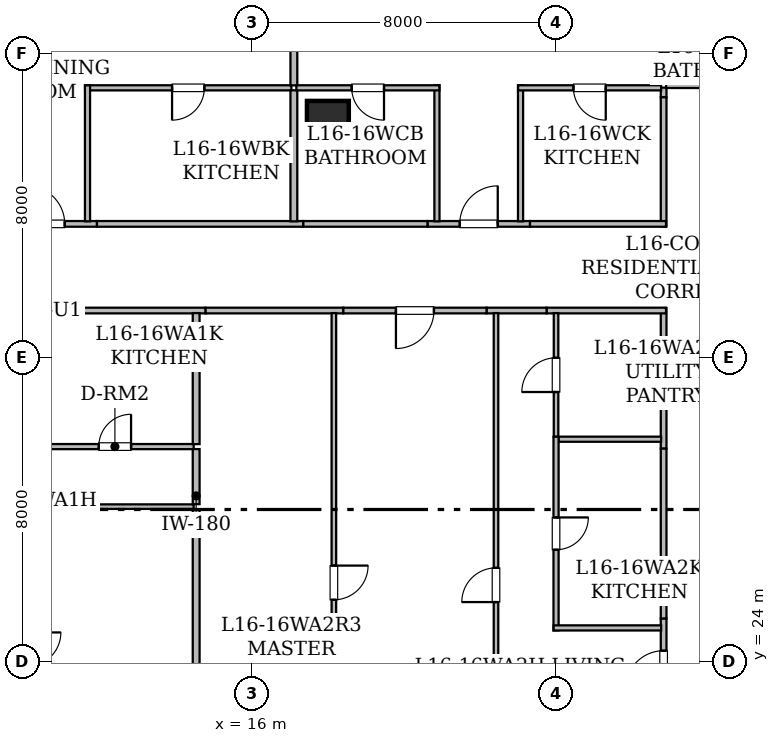
"""IFC4 building model, lengths in metres.
Left out: names, types, materials, properties, quantities, classifications, styles, units other than length and angle.
Written with IfcOpenShell. Run it as: python <this file> out.ifc"""

import sys

from ifc_helpers import new_model, si_unit, direction, frame, frame_2d, origin, origin_2d, place, context, subcontext, project, spatial, rectangle, hollow_rectangle, extrude, element, fill, save


model = new_model("IFC4")
c1 = context("Model", 3, precision=1e-05, world=origin(), true_north=direction((0.0, 1.0)))
c2 = subcontext(c1, "Body", "Model", "MODEL_VIEW")
j1 = project(units=[si_unit("LENGTHUNIT", "METRE"), si_unit("PLANEANGLEUNIT", "RADIAN")], contexts=[c1])
p1 = place(None, origin())
s1 = spatial("IfcSite", under=j1, at=p1, CompositionType="ELEMENT")
p2 = place(p1, origin())
s2 = spatial("IfcBuilding", under=s1, at=p2, CompositionType="ELEMENT")
p3 = place(p2, frame((0.0, 0.0, 66.15)))
s3 = spatial("IfcBuildingStorey", under=s2, at=p3, CompositionType="ELEMENT", Elevation=66.15)
p4 = place(p3, frame((18.0, 38.2, 0.0), z_axis=(0.0, 0.0, 1.0), x_axis=(1.0, 0.0, 0.0)))
e1 = element("IfcColumn", 1, at=p4, inside=s3, PredefinedType="COLUMN", context=c2, shape_type="SweptSolid", body=[
    extrude(hollow_rectangle(XDim=1.1, YDim=1.1, WallThickness=0.055, at=origin_2d()), origin(), (0.0, 0.0, 1.0), 3.65),
])
p5 = place(p3, frame((14.783, 33.235, 0.0), z_axis=(0.0, 0.0, 1.0), x_axis=(-1.0, 0.0, 0.0)))
e2 = element("IfcWall", 2, at=p5, inside=s3, PredefinedType="STANDARD", context=c2, shape_type="SweptSolid", body=[
    extrude(rectangle(XDim=4.145, YDim=0.15, at=frame_2d((2.073, 0.0))), origin(), (0.0, 0.0, 1.0), 3.43),
])
p6 = place(p3, frame((26.835, 29.6, 0.0), z_axis=(0.0, 0.0, 1.0), x_axis=(0.0, 1.0, 0.0)))
e3 = element("IfcWall", 3, at=p6, inside=s3, PredefinedType="STANDARD", context=c2, shape_type="SweptSolid", body=[
    extrude(rectangle(XDim=3.7, YDim=0.15, at=frame_2d((1.85, 0.0))), origin(), (0.0, 0.0, 1.0), 3.43),
])
p7 = place(p3, frame((26.898, 33.235, 0.0), z_axis=(0.0, 0.0, 1.0), x_axis=(-1.0, 0.0, 0.0)))
e4 = element("IfcWall", 4, at=p7, inside=s3, PredefinedType="STANDARD", context=c2, shape_type="SweptSolid", body=[
    extrude(rectangle(XDim=3.143, YDim=0.15, at=frame_2d((1.572, 0.0))), origin(), (0.0, 0.0, 1.0), 3.43),
])
p8 = place(p3, frame((26.835, 22.435, 0.0), z_axis=(0.0, 0.0, 1.0), x_axis=(0.0, 1.0, 0.0)))
e5 = element("IfcWall", 5, at=p8, inside=s3, PredefinedType="STANDARD", context=c2, shape_type="SweptSolid", body=[
    extrude(rectangle(XDim=2.698, YDim=0.15, at=frame_2d((1.349, 0.0))), origin(), (0.0, 0.0, 1.0), 3.065),
])
p9 = place(p8, frame((0.849, 0.0, 0.0)))
e6 = element("IfcOpeningElement", 6, at=p9, cuts=e5, PredefinedType="OPENING", context=c2, shape_type="SweptSolid", body=[
    extrude(rectangle(XDim=1.0, YDim=2.15, at=frame_2d((0.5, 1.075))), frame((0.0, 0.085, 0.0), z_axis=(0.0, -1.0, 0.0), x_axis=(1.0, 0.0, 0.0)), (0.0, 0.0, 1.0), 0.17),
])
p10 = place(p3, frame((23.755, 33.235, 0.0), z_axis=(0.0, 0.0, 1.0), x_axis=(-1.0, 0.0, 0.0)))
e7 = element("IfcWall", 7, at=p10, inside=s3, PredefinedType="STANDARD", context=c2, shape_type="SweptSolid", body=[
    extrude(rectangle(XDim=1.58, YDim=0.15, at=frame_2d((0.79, 0.0))), origin(), (0.0, 0.0, 1.0), 3.43),
])
p11 = place(p3, frame((26.835, 25.133, 0.0), z_axis=(0.0, 0.0, 1.0), x_axis=(0.0, 1.0, 0.0)))
e8 = element("IfcWall", 8, at=p11, inside=s3, PredefinedType="STANDARD", context=c2, shape_type="SweptSolid", body=[
    extrude(rectangle(XDim=4.467, YDim=0.15, at=frame_2d((2.233, 0.0))), origin(), (0.0, 0.0, 1.0), 3.43),
])
p12 = place(p3, frame((18.407, 33.235, 0.0), z_axis=(0.0, 0.0, 1.0), x_axis=(-1.0, 0.0, 0.0)))
e9 = element("IfcWall", 9, at=p12, inside=s3, PredefinedType="STANDARD", context=c2, shape_type="SweptSolid", body=[
    extrude(rectangle(XDim=3.624, YDim=0.15, at=frame_2d((1.812, 0.0))), origin(), (0.0, 0.0, 1.0), 2.647),
])
p13 = place(p3, frame((22.175, 33.235, 0.0), z_axis=(0.0, 0.0, 1.0), x_axis=(-1.0, 0.0, 0.0)))
e10 = element("IfcWall", 10, at=p13, inside=s3, PredefinedType="STANDARD", context=c2, shape_type="SweptSolid", body=[
    extrude(rectangle(XDim=3.768, YDim=0.15, at=frame_2d((1.884, 0.0))), origin(), (0.0, 0.0, 1.0), 3.43),
])
p14 = place(p13, frame((1.384, 0.0, 0.0)))
e11 = element("IfcOpeningElement", 11, at=p14, cuts=e10, PredefinedType="OPENING", context=c2, shape_type="SweptSolid", body=[
    extrude(rectangle(XDim=1.0, YDim=2.15, at=frame_2d((0.5, 1.075))), frame((0.0, 0.085, 0.0), z_axis=(0.0, -1.0, 0.0), x_axis=(1.0, 0.0, 0.0)), (0.0, 0.0, 1.0), 0.17),
])
p15 = place(p3, frame((9.226, 35.515, 0.0), z_axis=(0.0, 0.0, 1.0), x_axis=(1.0, 0.0, 0.0)))
e12 = element("IfcWall", 12, at=p15, inside=s3, PredefinedType="STANDARD", context=c2, shape_type="SweptSolid", body=[
    extrude(rectangle(XDim=2.698, YDim=0.15, at=frame_2d((1.349, 0.0))), origin(), (0.0, 0.0, 1.0), 3.43),
])
p16 = place(p15, frame((0.849, 0.0, 0.0)))
e13 = element("IfcOpeningElement", 13, at=p16, cuts=e12, PredefinedType="OPENING", context=c2, shape_type="SweptSolid", body=[
    extrude(rectangle(XDim=1.0, YDim=2.15, at=frame_2d((0.5, 1.075))), frame((0.0, 0.085, 0.0), z_axis=(0.0, -1.0, 0.0), x_axis=(1.0, 0.0, 0.0)), (0.0, 0.0, 1.0), 0.17),
])
p17 = place(p3, frame((11.924, 35.515, 0.0), z_axis=(0.0, 0.0, 1.0), x_axis=(1.0, 0.0, 0.0)))
e14 = element("IfcWall", 14, at=p17, inside=s3, PredefinedType="STANDARD", context=c2, shape_type="SweptSolid", body=[
    extrude(rectangle(XDim=5.43, YDim=0.15, at=frame_2d((2.715, 0.0))), origin(), (0.0, 0.0, 1.0), 3.43),
])
p18 = place(p3, frame((26.835, 38.846, 0.0), z_axis=(0.0, 0.0, 1.0), x_axis=(0.0, 1.0, 0.0)))
e15 = element("IfcWall", 15, at=p18, inside=s3, PredefinedType="STANDARD", context=c2, shape_type="SweptSolid", body=[
    extrude(rectangle(XDim=0.254, YDim=0.15, at=frame_2d((0.127, 0.0))), origin(), (0.0, 0.0, 1.0), 3.43),
])
p19 = place(p3, frame((20.621, 35.515, 0.0), z_axis=(0.0, 0.0, 1.0), x_axis=(1.0, 0.0, 0.0)))
e16 = element("IfcWall", 16, at=p19, inside=s3, PredefinedType="STANDARD", context=c2, shape_type="SweptSolid", body=[
    extrude(rectangle(XDim=2.698, YDim=0.15, at=frame_2d((1.349, 0.0))), origin(), (0.0, 0.0, 1.0), 3.43),
])
p20 = place(p19, frame((0.849, 0.0, 0.0)))
e17 = element("IfcOpeningElement", 17, at=p20, cuts=e16, PredefinedType="OPENING", context=c2, shape_type="SweptSolid", body=[
    extrude(rectangle(XDim=1.0, YDim=2.15, at=frame_2d((0.5, 1.075))), frame((0.0, 0.085, 0.0), z_axis=(0.0, -1.0, 0.0), x_axis=(1.0, 0.0, 0.0)), (0.0, 0.0, 1.0), 0.17),
])
p21 = place(p3, frame((17.354, 35.515, 0.0), z_axis=(0.0, 0.0, 1.0), x_axis=(1.0, 0.0, 0.0)))
e18 = element("IfcWall", 18, at=p21, inside=s3, PredefinedType="STANDARD", context=c2, shape_type="SweptSolid", body=[
    extrude(rectangle(XDim=3.267, YDim=0.15, at=frame_2d((1.634, 0.0))), origin(), (0.0, 0.0, 1.0), 2.647),
])
p22 = place(p3, frame((26.835, 35.45, 0.0), z_axis=(0.0, 0.0, 1.0), x_axis=(0.0, 1.0, 0.0)))
e19 = element("IfcWall", 19, at=p22, inside=s3, PredefinedType="STANDARD", context=c2, shape_type="SweptSolid", body=[
    extrude(rectangle(XDim=3.396, YDim=0.15, at=frame_2d((1.698, 0.0))), origin(), (0.0, 0.0, 1.0), 2.647),
])
p23 = place(p3, frame((23.319, 35.515, 0.0), z_axis=(0.0, 0.0, 1.0), x_axis=(1.0, 0.0, 0.0)))
e20 = element("IfcWall", 20, at=p23, inside=s3, PredefinedType="STANDARD", context=c2, shape_type="SweptSolid", body=[
    extrude(rectangle(XDim=3.579, YDim=0.15, at=frame_2d((1.79, 0.0))), origin(), (0.0, 0.0, 1.0), 3.43),
])
p24 = place(p3, frame((26.9, 39.165, 0.0), z_axis=(0.0, 0.0, 1.0), x_axis=(1.0, 0.0, 0.0)))
e21 = element("IfcWall", 21, at=p24, inside=s3, PredefinedType="STANDARD", context=c2, shape_type="SweptSolid", body=[
    extrude(rectangle(XDim=4.701, YDim=0.15, at=frame_2d((2.351, 0.0))), origin(), (0.0, 0.0, 1.0), 2.647),
])
p25 = place(p3, frame((10.324, 29.655, 0.0), z_axis=(0.0, 0.0, 1.0), x_axis=(1.0, 0.0, 0.0)))
e22 = element("IfcWall", 22, at=p25, inside=s3, PredefinedType="PARTITIONING", context=c2, shape_type="SweptSolid", body=[
    extrude(rectangle(XDim=4.145, YDim=0.135, at=frame_2d((2.073, 0.0))), origin(), (0.0, 0.0, 1.0), 3.43),
])
p26 = place(p25, frame((1.647, 0.0, 0.0)))
e23 = element("IfcOpeningElement", 23, at=p26, cuts=e22, PredefinedType="OPENING", context=c2, shape_type="SweptSolid", body=[
    extrude(rectangle(XDim=0.85, YDim=2.1, at=frame_2d((0.425, 1.05))), frame((0.0, 0.077, 0.0), z_axis=(0.0, -1.0, 0.0), x_axis=(1.0, 0.0, 0.0)), (0.0, 0.0, 1.0), 0.155),
])
p27 = place(p3, frame((11.169, 28.075, 0.0), z_axis=(0.0, 0.0, 1.0), x_axis=(-1.0, 0.0, 0.0)))
e24 = element("IfcWall", 24, at=p27, inside=s3, PredefinedType="PARTITIONING", context=c2, shape_type="SweptSolid", body=[
    extrude(rectangle(XDim=4.673, YDim=0.12, at=frame_2d((2.336, 0.0))), origin(), (0.0, 0.0, 1.0), 3.43),
])
p28 = place(p27, frame((3.115, 0.0, 0.0)))
e25 = element("IfcOpeningElement", 25, at=p28, cuts=e24, PredefinedType="OPENING", context=c2, shape_type="SweptSolid", body=[
    extrude(rectangle(XDim=0.9, YDim=2.1, at=frame_2d((0.45, 1.05))), frame((0.0, 0.07, 0.0), z_axis=(0.0, -1.0, 0.0), x_axis=(1.0, 0.0, 0.0)), (0.0, 0.0, 1.0), 0.14),
])
p29 = place(p3, frame((14.469, 28.075, 0.0), z_axis=(0.0, 0.0, 1.0), x_axis=(-1.0, 0.0, 0.0)))
e26 = element("IfcWall", 26, at=p29, inside=s3, PredefinedType="PARTITIONING", context=c2, shape_type="SweptSolid", body=[
    extrude(rectangle(XDim=3.3, YDim=0.12, at=frame_2d((1.65, 0.0))), origin(), (0.0, 0.0, 1.0), 3.43),
])
p30 = place(p3, frame((14.534, 29.59, 0.0), z_axis=(0.0, 0.0, 1.0), x_axis=(0.0, -1.0, 0.0)))
e27 = element("IfcWall", 27, at=p30, inside=s3, PredefinedType="STANDARD", context=c2, shape_type="SweptSolid", body=[
    extrude(rectangle(XDim=1.45, YDim=0.18, at=frame_2d((0.725, 0.0))), origin(), (0.0, 0.0, 1.0), 3.43),
])
p31 = place(p3, frame((14.534, 33.168, 0.0), z_axis=(0.0, 0.0, 1.0), x_axis=(0.0, -1.0, 0.0)))
e28 = element("IfcWall", 28, at=p31, inside=s3, PredefinedType="STANDARD", context=c2, shape_type="SweptSolid", body=[
    extrude(rectangle(XDim=3.448, YDim=0.18, at=frame_2d((1.724, 0.0))), origin(), (0.0, 0.0, 1.0), 3.43),
])
p32 = place(p3, frame((14.534, 28.01, 0.0), z_axis=(0.0, 0.0, 1.0), x_axis=(0.0, -1.0, 0.0)))
e29 = element("IfcWall", 29, at=p32, inside=s3, PredefinedType="STANDARD", context=c2, shape_type="SweptSolid", body=[
    extrude(rectangle(XDim=7.705, YDim=0.18, at=frame_2d((3.853, 0.0))), origin(), (0.0, 0.0, 1.0), 3.065),
])
p33 = place(p3, frame((24.004, 29.914, 0.0), z_axis=(0.0, 0.0, 1.0), x_axis=(0.0, 1.0, 0.0)))
e30 = element("IfcWall", 30, at=p33, inside=s3, PredefinedType="PARTITIONING", context=c2, shape_type="SweptSolid", body=[
    extrude(rectangle(XDim=3.254, YDim=0.12, at=frame_2d((1.627, 0.0))), origin(), (0.0, 0.0, 1.0), 3.43),
])
p34 = place(p33, frame((1.177, 0.0, 0.0)))
e31 = element("IfcOpeningElement", 31, at=p34, cuts=e30, PredefinedType="OPENING", context=c2, shape_type="SweptSolid", body=[
    extrude(rectangle(XDim=0.9, YDim=2.1, at=frame_2d((0.45, 1.05))), frame((0.0, 0.07, 0.0), z_axis=(0.0, -1.0, 0.0), x_axis=(1.0, 0.0, 0.0)), (0.0, 0.0, 1.0), 0.14),
])
p35 = place(p3, frame((26.77, 29.849, 0.0), z_axis=(0.0, 0.0, 1.0), x_axis=(-1.0, 0.0, 0.0)))
e32 = element("IfcWall", 32, at=p35, inside=s3, PredefinedType="PARTITIONING", context=c2, shape_type="SweptSolid", body=[
    extrude(rectangle(XDim=2.701, YDim=0.135, at=frame_2d((1.351, 0.0))), origin(), (0.0, 0.0, 1.0), 3.43),
])
p36 = place(p3, frame((24.004, 29.914, 0.0), z_axis=(0.0, 0.0, 1.0), x_axis=(0.0, -1.0, 0.0)))
e33 = element("IfcWall", 33, at=p36, inside=s3, PredefinedType="PARTITIONING", context=c2, shape_type="SweptSolid", body=[
    extrude(rectangle(XDim=5.095, YDim=0.135, at=frame_2d((2.547, 0.0))), origin(), (0.0, 0.0, 1.0), 3.43),
])
p37 = place(p36, frame((2.123, 0.0, 0.0)))
e34 = element("IfcOpeningElement", 34, at=p37, cuts=e33, PredefinedType="OPENING", context=c2, shape_type="SweptSolid", body=[
    extrude(rectangle(XDim=0.85, YDim=2.1, at=frame_2d((0.425, 1.05))), frame((0.0, 0.077, 0.0), z_axis=(0.0, -1.0, 0.0), x_axis=(1.0, 0.0, 0.0)), (0.0, 0.0, 1.0), 0.155),
])
p38 = place(p3, frame((23.939, 24.884, 0.0), z_axis=(0.0, 0.0, 1.0), x_axis=(1.0, 0.0, 0.0)))
e35 = element("IfcWall", 35, at=p38, inside=s3, PredefinedType="PARTITIONING", context=c2, shape_type="SweptSolid", body=[
    extrude(rectangle(XDim=2.831, YDim=0.135, at=frame_2d((1.416, 0.0))), origin(), (0.0, 0.0, 1.0), 3.43),
])
p39 = place(p3, frame((22.424, 18.86, 0.0), z_axis=(0.0, 0.0, 1.0), x_axis=(0.0, 1.0, 0.0)))
e36 = element("IfcWall", 36, at=p39, inside=s3, PredefinedType="PARTITIONING", context=c2, shape_type="SweptSolid", body=[
    extrude(rectangle(XDim=14.308, YDim=0.12, at=frame_2d((7.154, 0.0))), origin(), (0.0, 0.0, 1.0), 3.065),
])
p40 = place(p39, frame((6.704, 0.0, 0.0)))
e37 = element("IfcOpeningElement", 37, at=p40, cuts=e36, PredefinedType="OPENING", context=c2, shape_type="SweptSolid", body=[
    extrude(rectangle(XDim=0.9, YDim=2.1, at=frame_2d((0.45, 1.05))), frame((0.0, 0.07, 0.0), z_axis=(0.0, -1.0, 0.0), x_axis=(1.0, 0.0, 0.0)), (0.0, 0.0, 1.0), 0.14),
])
p41 = place(p3, frame((18.158, 33.168, 0.0), z_axis=(0.0, 0.0, 1.0), x_axis=(0.0, -1.0, 0.0)))
e38 = element("IfcWall", 38, at=p41, inside=s3, PredefinedType="PARTITIONING", context=c2, shape_type="SweptSolid", body=[
    extrude(rectangle(XDim=14.189, YDim=0.12, at=frame_2d((7.094, 0.0))), origin(), (0.0, 0.0, 1.0), 2.647),
])
p42 = place(p41, frame((6.644, 0.0, 0.0)))
e39 = element("IfcOpeningElement", 39, at=p42, cuts=e38, PredefinedType="OPENING", context=c2, shape_type="SweptSolid", body=[
    extrude(rectangle(XDim=0.9, YDim=2.1, at=frame_2d((0.45, 1.05))), frame((0.0, 0.07, 0.0), z_axis=(0.0, -1.0, 0.0), x_axis=(1.0, 0.0, 0.0)), (0.0, 0.0, 1.0), 0.14),
])
p43 = place(p3, frame((17.04, 39.095, 0.0), z_axis=(0.0, 0.0, 1.0), x_axis=(-1.0, 0.0, 0.0)))
e40 = element("IfcWall", 40, at=p43, inside=s3, PredefinedType="PARTITIONING", context=c2, shape_type="SweptSolid", body=[
    extrude(rectangle(XDim=5.43, YDim=0.135, at=frame_2d((2.715, 0.0))), origin(), (0.0, 0.0, 1.0), 2.647),
])
p44 = place(p43, frame((2.29, 0.0, 0.0)))
e41 = element("IfcOpeningElement", 41, at=p44, cuts=e40, PredefinedType="OPENING", context=c2, shape_type="SweptSolid", body=[
    extrude(rectangle(XDim=0.85, YDim=2.1, at=frame_2d((0.425, 1.05))), frame((0.0, 0.077, 0.0), z_axis=(0.0, -1.0, 0.0), x_axis=(1.0, 0.0, 0.0)), (0.0, 0.0, 1.0), 0.155),
])
p45 = place(p3, frame((11.675, 39.16, 0.0), z_axis=(0.0, 0.0, 1.0), x_axis=(0.0, -1.0, 0.0)))
e42 = element("IfcWall", 42, at=p45, inside=s3, PredefinedType="PARTITIONING", context=c2, shape_type="SweptSolid", body=[
    extrude(rectangle(XDim=3.578, YDim=0.135, at=frame_2d((1.789, 0.0))), origin(), (0.0, 0.0, 1.0), 2.647),
])
p46 = place(p3, frame((17.105, 41.41, 0.0), z_axis=(0.0, 0.0, 1.0), x_axis=(0.0, -1.0, 0.0)))
e43 = element("IfcWall", 43, at=p46, inside=s3, PredefinedType="STANDARD", context=c2, shape_type="SweptSolid", body=[
    extrude(rectangle(XDim=2.25, YDim=0.18, at=frame_2d((1.125, 0.0))), origin(), (0.0, 0.0, 1.0), 2.647),
])
p47 = place(p3, frame((17.105, 39.03, 0.0), z_axis=(0.0, 0.0, 1.0), x_axis=(0.0, -1.0, 0.0)))
e44 = element("IfcWall", 44, at=p47, inside=s3, PredefinedType="STANDARD", context=c2, shape_type="SweptSolid", body=[
    extrude(rectangle(XDim=3.448, YDim=0.18, at=frame_2d((1.724, 0.0))), origin(), (0.0, 0.0, 1.0), 2.647),
])
p48 = place(p3, frame((20.87, 35.582, 0.0), z_axis=(0.0, 0.0, 1.0), x_axis=(0.0, 1.0, 0.0)))
e45 = element("IfcWall", 45, at=p48, inside=s3, PredefinedType="PARTITIONING", context=c2, shape_type="SweptSolid", body=[
    extrude(rectangle(XDim=3.578, YDim=0.135, at=frame_2d((1.789, 0.0))), origin(), (0.0, 0.0, 1.0), 2.647),
])
p49 = place(p3, frame((20.935, 39.095, 0.0), z_axis=(0.0, 0.0, 1.0), x_axis=(-1.0, 0.0, 0.0)))
e46 = element("IfcWall", 46, at=p49, inside=s3, PredefinedType="PARTITIONING", context=c2, shape_type="SweptSolid", body=[
    extrude(rectangle(XDim=3.765, YDim=0.135, at=frame_2d((1.883, 0.0))), origin(), (0.0, 0.0, 1.0), 2.647),
])
p50 = place(p49, frame((1.458, 0.0, 0.0)))
e47 = element("IfcOpeningElement", 47, at=p50, cuts=e46, PredefinedType="OPENING", context=c2, shape_type="SweptSolid", body=[
    extrude(rectangle(XDim=0.85, YDim=2.1, at=frame_2d((0.425, 1.05))), frame((0.0, 0.077, 0.0), z_axis=(0.0, -1.0, 0.0), x_axis=(1.0, 0.0, 0.0)), (0.0, 0.0, 1.0), 0.155),
])
p51 = place(p3, frame((23.07, 39.16, 0.0), z_axis=(0.0, 0.0, 1.0), x_axis=(0.0, -1.0, 0.0)))
e48 = element("IfcWall", 48, at=p51, inside=s3, PredefinedType="PARTITIONING", context=c2, shape_type="SweptSolid", body=[
    extrude(rectangle(XDim=3.578, YDim=0.135, at=frame_2d((1.789, 0.0))), origin(), (0.0, 0.0, 1.0), 2.647),
])
p52 = place(p3, frame((26.77, 39.095, 0.0), z_axis=(0.0, 0.0, 1.0), x_axis=(-1.0, 0.0, 0.0)))
e49 = element("IfcWall", 49, at=p52, inside=s3, PredefinedType="PARTITIONING", context=c2, shape_type="SweptSolid", body=[
    extrude(rectangle(XDim=3.765, YDim=0.135, at=frame_2d((1.883, 0.0))), origin(), (0.0, 0.0, 1.0), 3.43),
])
p53 = place(p52, frame((1.458, 0.0, 0.0)))
e50 = element("IfcOpeningElement", 50, at=p53, cuts=e49, PredefinedType="OPENING", context=c2, shape_type="SweptSolid", body=[
    extrude(rectangle(XDim=0.85, YDim=2.1, at=frame_2d((0.425, 1.05))), frame((0.0, 0.077, 0.0), z_axis=(0.0, -1.0, 0.0), x_axis=(1.0, 0.0, 0.0)), (0.0, 0.0, 1.0), 0.155),
])
p54 = place(p3, frame((26.835, 41.41, 0.0), z_axis=(0.0, 0.0, 1.0), x_axis=(0.0, -1.0, 0.0)))
e51 = element("IfcWall", 51, at=p54, inside=s3, PredefinedType="STANDARD", context=c2, shape_type="SweptSolid", body=[
    extrude(rectangle(XDim=2.18, YDim=0.18, at=frame_2d((1.09, 0.0))), origin(), (0.0, 0.0, 1.0), 3.43),
])
p55 = place(p9, origin())
e52 = element("IfcDoor", 52, at=p55, inside=s3, OperationType="SINGLE_SWING_LEFT", PredefinedType="DOOR", context=c2, shape_type="SweptSolid", body=[
    extrude(rectangle(XDim=1.0, YDim=2.15, at=frame_2d((0.5, 1.075))), frame((0.0, 0.025, 0.0), z_axis=(0.0, -1.0, 0.0), x_axis=(1.0, 0.0, 0.0)), (0.0, 0.0, 1.0), 0.05),
])
fill(e6, e52)
p56 = place(p14, origin())
e53 = element("IfcDoor", 53, at=p56, inside=s3, OperationType="SINGLE_SWING_RIGHT", PredefinedType="DOOR", context=c2, shape_type="SweptSolid", body=[
    extrude(rectangle(XDim=1.0, YDim=2.15, at=frame_2d((0.5, 1.075))), frame((0.0, 0.025, 0.0), z_axis=(0.0, -1.0, 0.0), x_axis=(1.0, 0.0, 0.0)), (0.0, 0.0, 1.0), 0.05),
])
fill(e11, e53)
p57 = place(p16, origin())
e54 = element("IfcDoor", 54, at=p57, inside=s3, OperationType="SINGLE_SWING_LEFT", PredefinedType="DOOR", context=c2, shape_type="SweptSolid", body=[
    extrude(rectangle(XDim=1.0, YDim=2.15, at=frame_2d((0.5, 1.075))), frame((0.0, 0.025, 0.0), z_axis=(0.0, -1.0, 0.0), x_axis=(1.0, 0.0, 0.0)), (0.0, 0.0, 1.0), 0.05),
])
fill(e13, e54)
p58 = place(p20, origin())
e55 = element("IfcDoor", 55, at=p58, inside=s3, OperationType="SINGLE_SWING_RIGHT", PredefinedType="DOOR", context=c2, shape_type="SweptSolid", body=[
    extrude(rectangle(XDim=1.0, YDim=2.15, at=frame_2d((0.5, 1.075))), frame((0.0, 0.025, 0.0), z_axis=(0.0, -1.0, 0.0), x_axis=(1.0, 0.0, 0.0)), (0.0, 0.0, 1.0), 0.05),
])
fill(e17, e55)
p59 = place(p26, origin())
e56 = element("IfcDoor", 56, at=p59, inside=s3, OperationType="SINGLE_SWING_RIGHT", PredefinedType="DOOR", context=c2, shape_type="SweptSolid", body=[
    extrude(rectangle(XDim=0.85, YDim=2.1, at=frame_2d((0.425, 1.05))), frame((0.0, 0.025, 0.0), z_axis=(0.0, -1.0, 0.0), x_axis=(1.0, 0.0, 0.0)), (0.0, 0.0, 1.0), 0.05),
])
fill(e23, e56)
p60 = place(p34, origin())
e57 = element("IfcDoor", 57, at=p60, inside=s3, OperationType="SINGLE_SWING_LEFT", PredefinedType="DOOR", context=c2, shape_type="SweptSolid", body=[
    extrude(rectangle(XDim=0.9, YDim=2.1, at=frame_2d((0.45, 1.05))), frame((0.0, 0.025, 0.0), z_axis=(0.0, -1.0, 0.0), x_axis=(1.0, 0.0, 0.0)), (0.0, 0.0, 1.0), 0.05),
])
fill(e31, e57)
p61 = place(p37, origin())
e58 = element("IfcDoor", 58, at=p61, inside=s3, OperationType="SINGLE_SWING_LEFT", PredefinedType="DOOR", context=c2, shape_type="SweptSolid", body=[
    extrude(rectangle(XDim=0.85, YDim=2.1, at=frame_2d((0.425, 1.05))), frame((0.0, 0.025, 0.0), z_axis=(0.0, -1.0, 0.0), x_axis=(1.0, 0.0, 0.0)), (0.0, 0.0, 1.0), 0.05),
])
fill(e34, e58)
p62 = place(p40, origin())
e59 = element("IfcDoor", 59, at=p62, inside=s3, OperationType="SINGLE_SWING_LEFT", PredefinedType="DOOR", context=c2, shape_type="SweptSolid", body=[
    extrude(rectangle(XDim=0.9, YDim=2.1, at=frame_2d((0.45, 1.05))), frame((0.0, 0.025, 0.0), z_axis=(0.0, -1.0, 0.0), x_axis=(1.0, 0.0, 0.0)), (0.0, 0.0, 1.0), 0.05),
])
fill(e37, e59)
p63 = place(p42, origin())
e60 = element("IfcDoor", 60, at=p63, inside=s3, OperationType="SINGLE_SWING_LEFT", PredefinedType="DOOR", context=c2, shape_type="SweptSolid", body=[
    extrude(rectangle(XDim=0.9, YDim=2.1, at=frame_2d((0.45, 1.05))), frame((0.0, 0.025, 0.0), z_axis=(0.0, -1.0, 0.0), x_axis=(1.0, 0.0, 0.0)), (0.0, 0.0, 1.0), 0.05),
])
fill(e39, e60)
p64 = place(p44, origin())
e61 = element("IfcDoor", 61, at=p64, inside=s3, OperationType="SINGLE_SWING_RIGHT", PredefinedType="DOOR", context=c2, shape_type="SweptSolid", body=[
    extrude(rectangle(XDim=0.85, YDim=2.1, at=frame_2d((0.425, 1.05))), frame((0.0, 0.025, 0.0), z_axis=(0.0, -1.0, 0.0), x_axis=(1.0, 0.0, 0.0)), (0.0, 0.0, 1.0), 0.05),
])
fill(e41, e61)
p65 = place(p50, origin())
e62 = element("IfcDoor", 62, at=p65, inside=s3, OperationType="SINGLE_SWING_LEFT", PredefinedType="DOOR", context=c2, shape_type="SweptSolid", body=[
    extrude(rectangle(XDim=0.85, YDim=2.1, at=frame_2d((0.425, 1.05))), frame((0.0, 0.025, 0.0), z_axis=(0.0, -1.0, 0.0), x_axis=(1.0, 0.0, 0.0)), (0.0, 0.0, 1.0), 0.05),
])
fill(e47, e62)
p66 = place(p53, origin())
e63 = element("IfcDoor", 63, at=p66, inside=s3, OperationType="SINGLE_SWING_LEFT", PredefinedType="DOOR", context=c2, shape_type="SweptSolid", body=[
    extrude(rectangle(XDim=0.85, YDim=2.1, at=frame_2d((0.425, 1.05))), frame((0.0, 0.025, 0.0), z_axis=(0.0, -1.0, 0.0), x_axis=(1.0, 0.0, 0.0)), (0.0, 0.0, 1.0), 0.05),
])
fill(e50, e63)
save(model, sys.argv[1])
